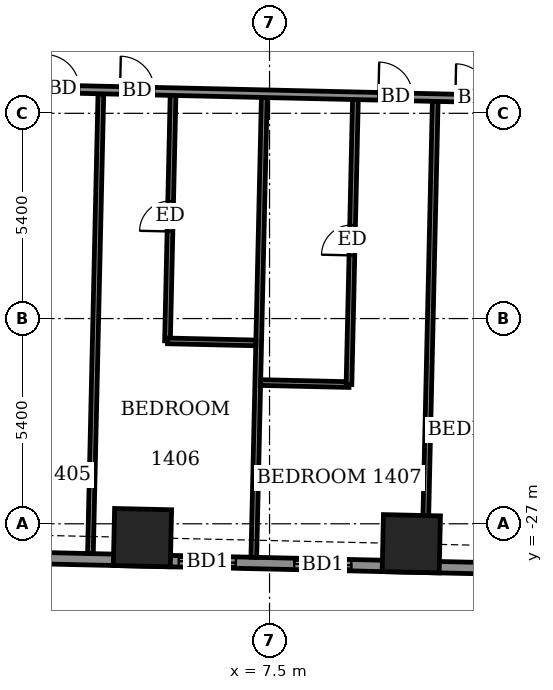
"""IFC4 building model, lengths in metres.
Left out: names, types, materials, properties, quantities, classifications, styles, units other than length and angle.
Written with IfcOpenShell. Run it as: python <this file> out.ifc"""

import sys

from ifc_helpers import new_model, si_unit, direction, frame, frame_2d, origin, origin_2d, place, context, subcontext, project, spatial, rectangle, extrude, element, fill, save


model = new_model("IFC4")
c1 = context("Model", 3, precision=1e-05, world=origin(), true_north=direction((0.0, 1.0)))
c2 = subcontext(c1, "Body", "Model", "MODEL_VIEW")
j1 = project(units=[si_unit("LENGTHUNIT", "METRE"), si_unit("PLANEANGLEUNIT", "RADIAN")], contexts=[c1])
p1 = place(None, origin())
s1 = spatial("IfcSite", under=j1, at=p1, CompositionType="ELEMENT")
p2 = place(p1, origin())
s2 = spatial("IfcBuilding", under=s1, at=p2, CompositionType="ELEMENT")
p3 = place(p2, frame((0.0, 0.0, 60.3)))
s3 = spatial("IfcBuildingStorey", under=s2, at=p3, CompositionType="ELEMENT", Elevation=60.3)
for number, where, z_axis, x_axis in (
    (1, (4.156, -27.364, -0.55), (0.0, 0.0, 1.0), (1.0, -0.023, 0.0)),
    (2, (11.23, -27.525, -0.55), (0.0, 0.0, 1.0), (1.0, -0.023, 0.0)),
):
    element("IfcColumn", number, at=place(p3, frame(where, z_axis=z_axis, x_axis=x_axis)), inside=s3, PredefinedType="COLUMN", context=c2, shape_type="SweptSolid", body=[
        extrude(rectangle(XDim=1.5, YDim=1.5, at=origin_2d()), origin(), (0.0, 0.0, 1.0), 3.6),
    ])
p4 = place(p3, frame((-24.007, -27.326, 0.0), z_axis=(0.0, 0.0, 1.0), x_axis=(0.999742536491, -0.022690542744, 0.0)))
e3 = element("IfcWall", 3, at=p4, inside=s3, PredefinedType="SOLIDWALL", context=c2, shape_type="SweptSolid", body=[
    extrude(rectangle(XDim=49.236, YDim=0.3, at=frame_2d((24.618, 0.0))), origin(), (0.0, 0.0, 1.0), 3.05),
])
p5 = place(p4, frame((2.115, 0.0, 0.0)))
e4 = element("IfcOpeningElement", 4, at=p5, cuts=e3, PredefinedType="OPENING", context=c2, shape_type="SweptSolid", body=[
    extrude(rectangle(XDim=1.5, YDim=2.4, at=frame_2d((0.75, 1.2))), frame((0.0, 0.16, 0.0), z_axis=(0.0, -1.0, 0.0), x_axis=(1.0, 0.0, 0.0)), (0.0, 0.0, 1.0), 0.32),
])
p6 = place(p4, frame((5.088, 0.0, 0.9)))
e5 = element("IfcOpeningElement", 5, at=p6, cuts=e3, PredefinedType="OPENING", context=c2, shape_type="SweptSolid", body=[
    extrude(rectangle(XDim=0.9, YDim=1.5, at=frame_2d((0.45, 0.75))), frame((0.0, 0.16, 0.0), z_axis=(0.0, -1.0, 0.0), x_axis=(1.0, 0.0, 0.0)), (0.0, 0.0, 1.0), 0.32),
])
p7 = place(p4, frame((10.475, 0.0, 0.0)))
e6 = element("IfcOpeningElement", 6, at=p7, cuts=e3, PredefinedType="OPENING", context=c2, shape_type="SweptSolid", body=[
    extrude(rectangle(XDim=1.5, YDim=2.4, at=frame_2d((0.75, 1.2))), frame((0.0, 0.16, 0.0), z_axis=(0.0, -1.0, 0.0), x_axis=(1.0, 0.0, 0.0)), (0.0, 0.0, 1.0), 0.32),
])
p8 = place(p4, frame((15.477, 0.0, 0.0)))
e7 = element("IfcOpeningElement", 7, at=p8, cuts=e3, PredefinedType="OPENING", context=c2, shape_type="SweptSolid", body=[
    extrude(rectangle(XDim=1.5, YDim=2.4, at=frame_2d((0.75, 1.2))), frame((0.0, 0.16, 0.0), z_axis=(0.0, -1.0, 0.0), x_axis=(1.0, 0.0, 0.0)), (0.0, 0.0, 1.0), 0.32),
])
p9 = place(p4, frame((18.515, 0.0, 0.0)))
e8 = element("IfcOpeningElement", 8, at=p9, cuts=e3, PredefinedType="OPENING", context=c2, shape_type="SweptSolid", body=[
    extrude(rectangle(XDim=1.5, YDim=2.4, at=frame_2d((0.75, 1.2))), frame((0.0, 0.16, 0.0), z_axis=(0.0, -1.0, 0.0), x_axis=(1.0, 0.0, 0.0)), (0.0, 0.0, 1.0), 0.32),
])
p10 = place(p4, frame((23.825, 0.0, 0.0)))
e9 = element("IfcOpeningElement", 9, at=p10, cuts=e3, PredefinedType="OPENING", context=c2, shape_type="SweptSolid", body=[
    extrude(rectangle(XDim=1.5, YDim=2.4, at=frame_2d((0.75, 1.2))), frame((0.0, 0.16, 0.0), z_axis=(0.0, -1.0, 0.0), x_axis=(1.0, 0.0, 0.0)), (0.0, 0.0, 1.0), 0.32),
])
p11 = place(p4, frame((29.128, 0.0, 0.0)))
e10 = element("IfcOpeningElement", 10, at=p11, cuts=e3, PredefinedType="OPENING", context=c2, shape_type="SweptSolid", body=[
    extrude(rectangle(XDim=1.5, YDim=2.4, at=frame_2d((0.75, 1.2))), frame((0.0, 0.16, 0.0), z_axis=(0.0, -1.0, 0.0), x_axis=(1.0, 0.0, 0.0)), (0.0, 0.0, 1.0), 0.32),
])
p12 = place(p4, frame((32.166, 0.0, 0.0)))
e11 = element("IfcOpeningElement", 11, at=p12, cuts=e3, PredefinedType="OPENING", context=c2, shape_type="SweptSolid", body=[
    extrude(rectangle(XDim=1.5, YDim=2.4, at=frame_2d((0.75, 1.2))), frame((0.0, 0.16, 0.0), z_axis=(0.0, -1.0, 0.0), x_axis=(1.0, 0.0, 0.0)), (0.0, 0.0, 1.0), 0.32),
])
p13 = place(p4, frame((37.091, 0.0, 0.0)))
e12 = element("IfcOpeningElement", 12, at=p13, cuts=e3, PredefinedType="OPENING", context=c2, shape_type="SweptSolid", body=[
    extrude(rectangle(XDim=1.5, YDim=2.4, at=frame_2d((0.75, 1.2))), frame((0.0, 0.16, 0.0), z_axis=(0.0, -1.0, 0.0), x_axis=(1.0, 0.0, 0.0)), (0.0, 0.0, 1.0), 0.32),
])
p14 = place(p4, frame((40.205, 0.0, 0.0)))
e13 = element("IfcOpeningElement", 13, at=p14, cuts=e3, PredefinedType="OPENING", context=c2, shape_type="SweptSolid", body=[
    extrude(rectangle(XDim=1.2, YDim=2.4, at=frame_2d((0.6, 1.2))), frame((0.0, 0.16, 0.0), z_axis=(0.0, -1.0, 0.0), x_axis=(1.0, 0.0, 0.0)), (0.0, 0.0, 1.0), 0.32),
])
p15 = place(p4, frame((45.047, 0.0, 0.9)))
e14 = element("IfcOpeningElement", 14, at=p15, cuts=e3, PredefinedType="OPENING", context=c2, shape_type="SweptSolid", body=[
    extrude(rectangle(XDim=2.4, YDim=1.5, at=frame_2d((1.2, 0.75))), frame((0.0, 0.16, 0.0), z_axis=(0.0, -1.0, 0.0), x_axis=(1.0, 0.0, 0.0)), (0.0, 0.0, 1.0), 0.32),
])
p16 = place(p3, frame((2.787, -27.784, 0.0), z_axis=(0.0, 0.0, 1.0), x_axis=(0.022719113715, 0.999741887625, 0.0)))
e15 = element("IfcWall", 15, at=p16, inside=s3, PredefinedType="PARTITIONING", context=c2, shape_type="SweptSolid", body=[
    extrude(rectangle(XDim=12.1, YDim=0.15, at=frame_2d((6.05, 0.0))), origin(), (0.0, 0.0, 1.0), 2.55),
])
p17 = place(p3, frame((7.086, -27.882, 0.0), z_axis=(0.0, 0.0, 1.0), x_axis=(0.022736986912, 0.999741481297, 0.0)))
e16 = element("IfcWall", 16, at=p17, inside=s3, PredefinedType="PARTITIONING", context=c2, shape_type="SweptSolid", body=[
    extrude(rectangle(XDim=12.101, YDim=0.15, at=frame_2d((6.051, 0.0))), origin(), (0.0, 0.0, 1.0), 2.55),
])
p18 = place(p3, frame((11.585, -27.984, 0.0), z_axis=(0.0, 0.0, 1.0), x_axis=(0.022737445516, 0.999741470867, 0.0)))
e17 = element("IfcWall", 17, at=p18, inside=s3, PredefinedType="PARTITIONING", context=c2, shape_type="SweptSolid", body=[
    extrude(rectangle(XDim=12.101, YDim=0.15, at=frame_2d((6.051, 0.0))), origin(), (0.0, 0.0, 1.0), 3.05),
])
p19 = place(p3, frame((7.268, -23.284, 0.0), z_axis=(0.0, 0.0, 1.0), x_axis=(0.999740260747, -0.02279059109, 0.0)))
e18 = element("IfcWall", 18, at=p19, inside=s3, PredefinedType="PARTITIONING", context=c2, shape_type="SweptSolid", body=[
    extrude(rectangle(XDim=2.324, YDim=0.15, at=frame_2d((1.162, 0.0))), origin(), (0.0, 0.0, 1.0), 3.05),
])
p20 = place(p3, frame((9.59, -23.337, 0.0), z_axis=(0.0, 0.0, 1.0), x_axis=(0.022657071855, 0.999743295599, 0.0)))
e19 = element("IfcWall", 19, at=p20, inside=s3, PredefinedType="PARTITIONING", context=c2, shape_type="SweptSolid", body=[
    extrude(rectangle(XDim=7.5, YDim=0.15, at=frame_2d((3.75, 0.0))), origin(), (0.0, 0.0, 1.0), 3.05),
])
p21 = place(p20, frame((3.4, 0.0, 0.0)))
e20 = element("IfcOpeningElement", 20, at=p21, cuts=e19, PredefinedType="OPENING", context=c2, shape_type="SweptSolid", body=[
    extrude(rectangle(XDim=0.8, YDim=2.1, at=frame_2d((0.4, 1.05))), frame((0.0, 0.085, 0.0), z_axis=(0.0, -1.0, 0.0), x_axis=(1.0, 0.0, 0.0)), (0.0, 0.0, 1.0), 0.17),
])
p22 = place(p3, frame((4.815, -22.188, 0.0), z_axis=(0.0, 0.0, 1.0), x_axis=(0.022601211511, 0.999744559994, 0.0)))
e21 = element("IfcWall", 21, at=p22, inside=s3, PredefinedType="PARTITIONING", context=c2, shape_type="SweptSolid", body=[
    extrude(rectangle(XDim=6.46, YDim=0.15, at=frame_2d((3.23, 0.0))), origin(), (0.0, 0.0, 1.0), 3.05),
])
p23 = place(p22, frame((2.88, 0.0, 0.0)))
e22 = element("IfcOpeningElement", 22, at=p23, cuts=e21, PredefinedType="OPENING", context=c2, shape_type="SweptSolid", body=[
    extrude(rectangle(XDim=0.8, YDim=2.1, at=frame_2d((0.4, 1.05))), frame((0.0, 0.085, 0.0), z_axis=(0.0, -1.0, 0.0), x_axis=(1.0, 0.0, 0.0)), (0.0, 0.0, 1.0), 0.17),
])
p24 = place(p3, frame((4.817, -22.188, 0.0), z_axis=(0.0, 0.0, 1.0), x_axis=(0.99974031529, -0.022788198363, 0.0)))
e23 = element("IfcWall", 23, at=p24, inside=s3, PredefinedType="PARTITIONING", context=c2, shape_type="SweptSolid", body=[
    extrude(rectangle(XDim=2.325, YDim=0.15, at=frame_2d((1.162, 0.0))), origin(), (0.0, 0.0, 1.0), 3.05),
])
p25 = place(p3, frame((-26.126, -14.924, 0.0), z_axis=(0.0, 0.0, 1.0), x_axis=(0.999742687583, -0.0226838847, 0.0)))
e24 = element("IfcWall", 24, at=p25, inside=s3, PredefinedType="PARTITIONING", context=c2, shape_type="SweptSolid", body=[
    extrude(rectangle(XDim=54.836, YDim=0.2, at=frame_2d((27.418, 0.0))), origin(), (0.0, 0.0, 1.0), 3.05),
])
p26 = place(p25, frame((0.775, 0.0, 0.0)))
e25 = element("IfcOpeningElement", 25, at=p26, cuts=e24, PredefinedType="OPENING", context=c2, shape_type="SweptSolid", body=[
    extrude(rectangle(XDim=1.0, YDim=2.1, at=frame_2d((0.5, 1.05))), frame((0.0, 0.11, 0.0), z_axis=(0.0, -1.0, 0.0), x_axis=(1.0, 0.0, 0.0)), (0.0, 0.0, 1.0), 0.22),
])
p27 = place(p25, frame((5.45, 0.0, 0.0)))
e26 = element("IfcOpeningElement", 26, at=p27, cuts=e24, PredefinedType="OPENING", context=c2, shape_type="SweptSolid", body=[
    extrude(rectangle(XDim=0.9, YDim=2.1, at=frame_2d((0.45, 1.05))), frame((0.0, 0.11, 0.0), z_axis=(0.0, -1.0, 0.0), x_axis=(1.0, 0.0, 0.0)), (0.0, 0.0, 1.0), 0.22),
])
p28 = place(p25, frame((10.0, 0.0, 0.0)))
e27 = element("IfcOpeningElement", 27, at=p28, cuts=e24, PredefinedType="OPENING", context=c2, shape_type="SweptSolid", body=[
    extrude(rectangle(XDim=0.9, YDim=2.1, at=frame_2d((0.45, 1.05))), frame((0.0, 0.11, 0.0), z_axis=(0.0, -1.0, 0.0), x_axis=(1.0, 0.0, 0.0)), (0.0, 0.0, 1.0), 0.22),
])
p29 = place(p25, frame((11.975, 0.0, 0.0)))
e28 = element("IfcOpeningElement", 28, at=p29, cuts=e24, PredefinedType="OPENING", context=c2, shape_type="SweptSolid", body=[
    extrude(rectangle(XDim=0.9, YDim=2.1, at=frame_2d((0.45, 1.05))), frame((0.0, 0.11, 0.0), z_axis=(0.0, -1.0, 0.0), x_axis=(1.0, 0.0, 0.0)), (0.0, 0.0, 1.0), 0.22),
])
p30 = place(p25, frame((18.85, 0.0, 0.0)))
e29 = element("IfcOpeningElement", 29, at=p30, cuts=e24, PredefinedType="OPENING", context=c2, shape_type="SweptSolid", body=[
    extrude(rectangle(XDim=0.9, YDim=2.1, at=frame_2d((0.45, 1.05))), frame((0.0, 0.11, 0.0), z_axis=(0.0, -1.0, 0.0), x_axis=(1.0, 0.0, 0.0)), (0.0, 0.0, 1.0), 0.22),
])
p31 = place(p25, frame((20.9, 0.0, 0.0)))
e30 = element("IfcOpeningElement", 30, at=p31, cuts=e24, PredefinedType="OPENING", context=c2, shape_type="SweptSolid", body=[
    extrude(rectangle(XDim=0.9, YDim=2.1, at=frame_2d((0.45, 1.05))), frame((0.0, 0.11, 0.0), z_axis=(0.0, -1.0, 0.0), x_axis=(1.0, 0.0, 0.0)), (0.0, 0.0, 1.0), 0.22),
])
p32 = place(p25, frame((27.725, 0.0, 0.0)))
e31 = element("IfcOpeningElement", 31, at=p32, cuts=e24, PredefinedType="OPENING", context=c2, shape_type="SweptSolid", body=[
    extrude(rectangle(XDim=0.9, YDim=2.1, at=frame_2d((0.45, 1.05))), frame((0.0, 0.11, 0.0), z_axis=(0.0, -1.0, 0.0), x_axis=(1.0, 0.0, 0.0)), (0.0, 0.0, 1.0), 0.22),
])
p33 = place(p25, frame((29.7, 0.0, 0.0)))
e32 = element("IfcOpeningElement", 32, at=p33, cuts=e24, PredefinedType="OPENING", context=c2, shape_type="SweptSolid", body=[
    extrude(rectangle(XDim=0.9, YDim=2.1, at=frame_2d((0.45, 1.05))), frame((0.0, 0.11, 0.0), z_axis=(0.0, -1.0, 0.0), x_axis=(1.0, 0.0, 0.0)), (0.0, 0.0, 1.0), 0.22),
])
p34 = place(p25, frame((36.5, 0.0, 0.0)))
e33 = element("IfcOpeningElement", 33, at=p34, cuts=e24, PredefinedType="OPENING", context=c2, shape_type="SweptSolid", body=[
    extrude(rectangle(XDim=0.9, YDim=2.1, at=frame_2d((0.45, 1.05))), frame((0.0, 0.11, 0.0), z_axis=(0.0, -1.0, 0.0), x_axis=(1.0, 0.0, 0.0)), (0.0, 0.0, 1.0), 0.22),
])
p35 = place(p25, frame((38.525, 0.0, 0.0)))
e34 = element("IfcOpeningElement", 34, at=p35, cuts=e24, PredefinedType="OPENING", context=c2, shape_type="SweptSolid", body=[
    extrude(rectangle(XDim=0.9, YDim=2.1, at=frame_2d((0.45, 1.05))), frame((0.0, 0.11, 0.0), z_axis=(0.0, -1.0, 0.0), x_axis=(1.0, 0.0, 0.0)), (0.0, 0.0, 1.0), 0.22),
])
p36 = place(p25, frame((45.325, 0.0, 0.0)))
e35 = element("IfcOpeningElement", 35, at=p36, cuts=e24, PredefinedType="OPENING", context=c2, shape_type="SweptSolid", body=[
    extrude(rectangle(XDim=0.9, YDim=2.1, at=frame_2d((0.45, 1.05))), frame((0.0, 0.11, 0.0), z_axis=(0.0, -1.0, 0.0), x_axis=(1.0, 0.0, 0.0)), (0.0, 0.0, 1.0), 0.22),
])
p37 = place(p25, frame((52.593, 0.0, 0.0)))
e36 = element("IfcOpeningElement", 36, at=p37, cuts=e24, PredefinedType="OPENING", context=c2, shape_type="SweptSolid", body=[
    extrude(rectangle(XDim=1.0, YDim=2.1, at=frame_2d((0.5, 1.05))), frame((0.0, 0.11, 0.0), z_axis=(0.0, -1.0, 0.0), x_axis=(1.0, 0.0, 0.0)), (0.0, 0.0, 1.0), 0.22),
])
p38 = place(p25, frame((47.55, 0.0, 0.0)))
e37 = element("IfcOpeningElement", 37, at=p38, cuts=e24, PredefinedType="OPENING", context=c2, shape_type="SweptSolid", body=[
    extrude(rectangle(XDim=0.9, YDim=2.1, at=frame_2d((0.45, 1.05))), frame((0.0, 0.11, 0.0), z_axis=(0.0, -1.0, 0.0), x_axis=(1.0, 0.0, 0.0)), (0.0, 0.0, 1.0), 0.22),
])
p39 = place(p11, origin())
e38 = element("IfcDoor", 38, at=p39, inside=s3, OperationType="SLIDING_TO_LEFT", PredefinedType="DOOR", context=c2, shape_type="SweptSolid", body=[
    extrude(rectangle(XDim=1.5, YDim=2.4, at=frame_2d((0.75, 1.2))), frame((0.0, 0.025, 0.0), z_axis=(0.0, -1.0, 0.0), x_axis=(1.0, 0.0, 0.0)), (0.0, 0.0, 1.0), 0.05),
])
fill(e10, e38)
p40 = place(p12, origin())
e39 = element("IfcDoor", 39, at=p40, inside=s3, OperationType="SLIDING_TO_LEFT", PredefinedType="DOOR", context=c2, shape_type="SweptSolid", body=[
    extrude(rectangle(XDim=1.5, YDim=2.4, at=frame_2d((0.75, 1.2))), frame((0.0, 0.025, 0.0), z_axis=(0.0, -1.0, 0.0), x_axis=(1.0, 0.0, 0.0)), (0.0, 0.0, 1.0), 0.05),
])
fill(e11, e39)
p41 = place(p32, origin())
e40 = element("IfcDoor", 40, at=p41, inside=s3, OperationType="SINGLE_SWING_LEFT", PredefinedType="DOOR", context=c2, shape_type="SweptSolid", body=[
    extrude(rectangle(XDim=0.9, YDim=2.1, at=frame_2d((0.45, 1.05))), frame((0.0, 0.025, 0.0), z_axis=(0.0, -1.0, 0.0), x_axis=(1.0, 0.0, 0.0)), (0.0, 0.0, 1.0), 0.05),
])
fill(e31, e40)
p42 = place(p33, origin())
e41 = element("IfcDoor", 41, at=p42, inside=s3, OperationType="SINGLE_SWING_RIGHT", PredefinedType="DOOR", context=c2, shape_type="SweptSolid", body=[
    extrude(rectangle(XDim=0.9, YDim=2.1, at=frame_2d((0.45, 1.05))), frame((0.0, 0.025, 0.0), z_axis=(0.0, -1.0, 0.0), x_axis=(1.0, 0.0, 0.0)), (0.0, 0.0, 1.0), 0.05),
])
fill(e32, e41)
p43 = place(p23, origin())
e42 = element("IfcDoor", 42, at=p43, inside=s3, OperationType="SINGLE_SWING_RIGHT", PredefinedType="DOOR", context=c2, shape_type="SweptSolid", body=[
    extrude(rectangle(XDim=0.8, YDim=2.1, at=frame_2d((0.4, 1.05))), frame((0.0, 0.025, 0.0), z_axis=(0.0, -1.0, 0.0), x_axis=(1.0, 0.0, 0.0)), (0.0, 0.0, 1.0), 0.05),
])
fill(e22, e42)
p44 = place(p34, origin())
e43 = element("IfcDoor", 43, at=p44, inside=s3, OperationType="SINGLE_SWING_LEFT", PredefinedType="DOOR", context=c2, shape_type="SweptSolid", body=[
    extrude(rectangle(XDim=0.9, YDim=2.1, at=frame_2d((0.45, 1.05))), frame((0.0, 0.025, 0.0), z_axis=(0.0, -1.0, 0.0), x_axis=(1.0, 0.0, 0.0)), (0.0, 0.0, 1.0), 0.05),
])
fill(e33, e43)
p45 = place(p21, origin())
e44 = element("IfcDoor", 44, at=p45, inside=s3, OperationType="SINGLE_SWING_LEFT", PredefinedType="DOOR", context=c2, shape_type="SweptSolid", body=[
    extrude(rectangle(XDim=0.8, YDim=2.1, at=frame_2d((0.4, 1.05))), frame((0.0, 0.025, 0.0), z_axis=(0.0, -1.0, 0.0), x_axis=(1.0, 0.0, 0.0)), (0.0, 0.0, 1.0), 0.05),
])
fill(e20, e44)
p46 = place(p35, origin())
e45 = element("IfcDoor", 45, at=p46, inside=s3, OperationType="SINGLE_SWING_RIGHT", PredefinedType="DOOR", context=c2, shape_type="SweptSolid", body=[
    extrude(rectangle(XDim=0.9, YDim=2.1, at=frame_2d((0.45, 1.05))), frame((0.0, 0.025, 0.0), z_axis=(0.0, -1.0, 0.0), x_axis=(1.0, 0.0, 0.0)), (0.0, 0.0, 1.0), 0.05),
])
fill(e34, e45)
save(model, sys.argv[1])
